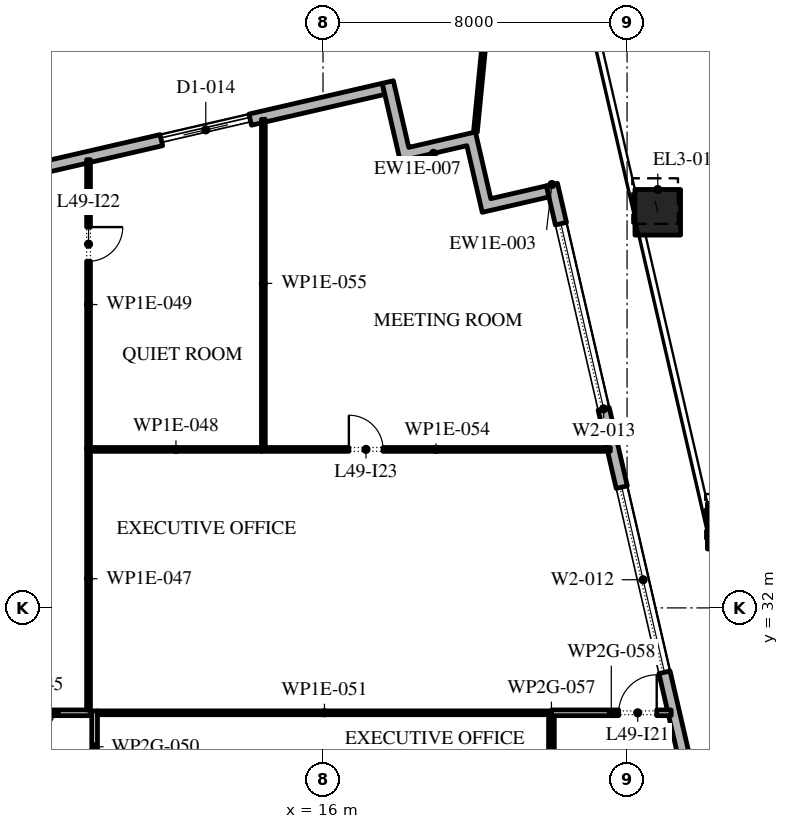
"""IFC4 building model, lengths in metres.
Left out: names, types, materials, properties, quantities, classifications, styles, units other than length and angle.
Written with IfcOpenShell. Run it as: python <this file> out.ifc"""

import sys

from ifc_helpers import new_model, si_unit, direction, frame, frame_2d, origin, origin_2d, place, context, subcontext, project, spatial, polyline, rectangle, outline, extrude, element, fill, save


model = new_model("IFC4")
c1 = context("Model", 3, precision=1e-05, world=origin(), true_north=direction((0.0, 1.0)))
c2 = subcontext(c1, "Body", "Model", "MODEL_VIEW")
j1 = project(units=[si_unit("LENGTHUNIT", "METRE"), si_unit("PLANEANGLEUNIT", "RADIAN")], contexts=[c1])
p1 = place(None, origin())
s1 = spatial("IfcSite", under=j1, at=p1, CompositionType="ELEMENT")
p2 = place(p1, origin())
s2 = spatial("IfcBuilding", under=s1, at=p2, CompositionType="ELEMENT")
p3 = place(p2, frame((0.0, 0.0, 222.0)))
s3 = spatial("IfcBuildingStorey", under=s2, at=p3, CompositionType="ELEMENT", Elevation=222.0)
p4 = place(p3, frame((26.715, 34.15, 0.0), z_axis=(-0.013461799865, 0.058373149415, 0.998204064995), x_axis=(-0.974423835271, -0.224718021653, 0.0)))
e1 = element("IfcColumn", 1, at=p4, inside=s3, PredefinedType="COLUMN", context=c2, shape_type="SweptSolid", body=[
    extrude(rectangle(XDim=1.2, YDim=1.2, at=origin_2d()), origin(), (0.0, 0.0, 1.0), 4.208),
])
p5 = place(p3, frame((24.808, 42.409, 0.0), z_axis=(-0.016176147103, 0.070038658424, 0.997413113304), x_axis=(-0.97435039746, -0.225036225904, 0.0)))
e2 = element("IfcColumn", 2, at=p5, inside=s3, PredefinedType="COLUMN", context=c2, shape_type="SweptSolid", body=[
    extrude(rectangle(XDim=1.2, YDim=1.2, at=origin_2d()), origin(), (0.0, 0.0, 1.0), 4.211),
])
p6 = place(p3, frame((33.157, -5.092, 0.0), z_axis=(0.0, 0.0, 1.0), x_axis=(-0.224950279389, 0.974370243697, 0.0)))
e3 = element("IfcWall", 3, at=p6, inside=s3, PredefinedType="STANDARD", context=c2, shape_type="SweptSolid", body=[
    extrude(rectangle(XDim=49.5, YDim=0.3, at=frame_2d((24.75, 0.0))), origin(), (0.0, 0.0, 1.0), 3.75),
])
p7 = place(p6, frame((2.207, 0.0, 0.0)))
e4 = element("IfcOpeningElement", 4, at=p7, cuts=e3, PredefinedType="OPENING", context=c2, shape_type="SweptSolid", body=[
    extrude(rectangle(XDim=2.4, YDim=2.875, at=frame_2d((1.2, 1.438))), frame((0.0, 0.16, 0.0), z_axis=(0.0, -1.0, 0.0), x_axis=(1.0, 0.0, 0.0)), (0.0, 0.0, 1.0), 0.32),
])
p8 = place(p6, frame((7.871, 0.0, 0.45)))
e5 = element("IfcOpeningElement", 5, at=p8, cuts=e3, PredefinedType="OPENING", context=c2, shape_type="SweptSolid", body=[
    extrude(rectangle(XDim=5.0, YDim=2.575, at=frame_2d((2.5, 1.288))), frame((0.0, 0.16, 0.0), z_axis=(0.0, -1.0, 0.0), x_axis=(1.0, 0.0, 0.0)), (0.0, 0.0, 1.0), 0.32),
])
p9 = place(p6, frame((14.986, 0.0, 0.45)))
e6 = element("IfcOpeningElement", 6, at=p9, cuts=e3, PredefinedType="OPENING", context=c2, shape_type="SweptSolid", body=[
    extrude(rectangle(XDim=5.0, YDim=2.625, at=frame_2d((2.5, 1.312))), frame((0.0, 0.16, 0.0), z_axis=(0.0, -1.0, 0.0), x_axis=(1.0, 0.0, 0.0)), (0.0, 0.0, 1.0), 0.32),
])
p10 = place(p6, frame((22.1, 0.0, 0.45)))
e7 = element("IfcOpeningElement", 7, at=p10, cuts=e3, PredefinedType="OPENING", context=c2, shape_type="SweptSolid", body=[
    extrude(rectangle(XDim=5.0, YDim=2.75, at=frame_2d((2.5, 1.375))), frame((0.0, 0.16, 0.0), z_axis=(0.0, -1.0, 0.0), x_axis=(1.0, 0.0, 0.0)), (0.0, 0.0, 1.0), 0.32),
])
p11 = place(p6, frame((30.514, 0.0, 0.0)))
e8 = element("IfcOpeningElement", 8, at=p11, cuts=e3, PredefinedType="OPENING", context=c2, shape_type="SweptSolid", body=[
    extrude(rectangle(XDim=2.4, YDim=3.2, at=frame_2d((1.2, 1.6))), frame((0.0, 0.16, 0.0), z_axis=(0.0, -1.0, 0.0), x_axis=(1.0, 0.0, 0.0)), (0.0, 0.0, 1.0), 0.32),
])
p12 = place(p6, frame((36.329, 0.0, 0.45)))
e9 = element("IfcOpeningElement", 9, at=p12, cuts=e3, PredefinedType="OPENING", context=c2, shape_type="SweptSolid", body=[
    extrude(rectangle(XDim=5.0, YDim=3.25, at=frame_2d((2.5, 1.625))), frame((0.0, 0.16, 0.0), z_axis=(0.0, -1.0, 0.0), x_axis=(1.0, 0.0, 0.0)), (0.0, 0.0, 1.0), 0.32),
])
p13 = place(p6, frame((43.443, 0.0, 0.45)))
e10 = element("IfcOpeningElement", 10, at=p13, cuts=e3, PredefinedType="OPENING", context=c2, shape_type="SweptSolid", body=[
    extrude(rectangle(XDim=5.0, YDim=3.25, at=frame_2d((2.5, 1.625))), frame((0.0, 0.16, 0.0), z_axis=(0.0, -1.0, 0.0), x_axis=(1.0, 0.0, 0.0)), (0.0, 0.0, 1.0), 0.32),
])
p14 = place(p3, frame((17.592, 45.657, 0.0), z_axis=(0.0, 0.0, 1.0), x_axis=(-0.974370243697, -0.224950279389, 0.0)))
e11 = element("IfcWall", 11, at=p14, inside=s3, PredefinedType="STANDARD", context=c2, shape_type="SweptSolid", body=[
    extrude(rectangle(XDim=49.5, YDim=0.3, at=frame_2d((24.75, 0.0))), origin(), (0.0, 0.0, 1.0), 3.75),
])
p15 = place(p14, frame((3.6, 0.0, 0.0)))
e12 = element("IfcOpeningElement", 12, at=p15, cuts=e11, PredefinedType="OPENING", context=c2, shape_type="SweptSolid", body=[
    extrude(rectangle(XDim=2.4, YDim=3.5, at=frame_2d((1.2, 1.75))), frame((0.0, 0.16, 0.0), z_axis=(0.0, -1.0, 0.0), x_axis=(1.0, 0.0, 0.0)), (0.0, 0.0, 1.0), 0.32),
])
p16 = place(p14, frame((9.65, 0.0, 0.45)))
e13 = element("IfcOpeningElement", 13, at=p16, cuts=e11, PredefinedType="OPENING", context=c2, shape_type="SweptSolid", body=[
    extrude(rectangle(XDim=5.0, YDim=2.2, at=frame_2d((2.5, 1.1))), frame((0.0, 0.16, 0.0), z_axis=(0.0, -1.0, 0.0), x_axis=(1.0, 0.0, 0.0)), (0.0, 0.0, 1.0), 0.32),
])
p17 = place(p14, frame((17.95, 0.0, 0.45)))
e14 = element("IfcOpeningElement", 14, at=p17, cuts=e11, PredefinedType="OPENING", context=c2, shape_type="SweptSolid", body=[
    extrude(rectangle(XDim=5.0, YDim=2.2, at=frame_2d((2.5, 1.1))), frame((0.0, 0.16, 0.0), z_axis=(0.0, -1.0, 0.0), x_axis=(1.0, 0.0, 0.0)), (0.0, 0.0, 1.0), 0.32),
])
p18 = place(p14, frame((26.25, 0.0, 0.45)))
e15 = element("IfcOpeningElement", 15, at=p18, cuts=e11, PredefinedType="OPENING", context=c2, shape_type="SweptSolid", body=[
    extrude(rectangle(XDim=5.0, YDim=2.2, at=frame_2d((2.5, 1.1))), frame((0.0, 0.16, 0.0), z_axis=(0.0, -1.0, 0.0), x_axis=(1.0, 0.0, 0.0)), (0.0, 0.0, 1.0), 0.32),
])
p19 = place(p14, frame((35.85, 0.0, 0.0)))
e16 = element("IfcOpeningElement", 16, at=p19, cuts=e11, PredefinedType="OPENING", context=c2, shape_type="SweptSolid", body=[
    extrude(rectangle(XDim=2.4, YDim=2.7, at=frame_2d((1.2, 1.35))), frame((0.0, 0.16, 0.0), z_axis=(0.0, -1.0, 0.0), x_axis=(1.0, 0.0, 0.0)), (0.0, 0.0, 1.0), 0.32),
])
p20 = place(p14, frame((42.85, 0.0, 0.45)))
e17 = element("IfcOpeningElement", 17, at=p20, cuts=e11, PredefinedType="OPENING", context=c2, shape_type="SweptSolid", body=[
    extrude(rectangle(XDim=5.0, YDim=2.275, at=frame_2d((2.5, 1.137))), frame((0.0, 0.16, 0.0), z_axis=(0.0, -1.0, 0.0), x_axis=(1.0, 0.0, 0.0)), (0.0, 0.0, 1.0), 0.32),
])
p21 = place(p3, origin())
e18 = element("IfcWall", 18, at=p21, inside=s3, PredefinedType="STANDARD", context=c2, shape_type="SweptSolid", body=[
    extrude(outline(polyline([(19.785, 44.162), (18.031, 43.757), (17.558, 45.803), (17.851, 45.871), (18.256, 44.117), (20.01, 44.522), (20.414, 42.768), (21.876, 43.105), (21.943, 42.813), (20.19, 42.408), (19.785, 44.162)])), origin(), (0.0, 0.0, 1.0), 3.75),
])
p22 = place(p3, frame((20.01, 44.522, -0.05), z_axis=(0.0, 0.0, 1.0), x_axis=(0.097239826171, 0.995260978943, 0.0)))
e19 = element("IfcWall", 19, at=p22, inside=s3, PredefinedType="STANDARD", context=c2, shape_type="SweptSolid", body=[
    extrude(rectangle(XDim=6.663, YDim=0.1, at=frame_2d((3.332, 0.0))), origin(), (0.0, 0.0, 1.0), 3.8),
])
p23 = place(p3, frame((8.085, 29.24, 0.0), z_axis=(0.0, 0.0, 1.0), x_axis=(1.0, 0.0, 0.0)))
e20 = element("IfcWall", 20, at=p23, inside=s3, PredefinedType="PARTITIONING", context=c2, shape_type="SweptSolid", body=[
    extrude(rectangle(XDim=1.795, YDim=0.15, at=frame_2d((0.897, 0.0))), origin(), (0.0, 0.0, 1.0), 3.75),
])
p24 = place(p3, frame((9.83, 36.22, 0.0), z_axis=(0.0, 0.0, 1.0), x_axis=(0.0, -1.0, 0.0)))
e21 = element("IfcWall", 21, at=p24, inside=s3, PredefinedType="PARTITIONING", context=c2, shape_type="SweptSolid", body=[
    extrude(rectangle(XDim=6.905, YDim=0.1, at=frame_2d((3.453, 0.0))), origin(), (0.0, 0.0, 1.0), 3.75),
])
p25 = place(p3, frame((9.88, 36.17, 0.0), z_axis=(0.0, 0.0, 1.0), x_axis=(1.0, 0.0, 0.0)))
e22 = element("IfcWall", 22, at=p25, inside=s3, PredefinedType="PARTITIONING", context=c2, shape_type="SweptSolid", body=[
    extrude(rectangle(XDim=4.5, YDim=0.1, at=frame_2d((2.25, 0.0))), origin(), (0.0, 0.0, 1.0), 3.75),
])
p26 = place(p3, frame((9.83, 43.794, 0.0), z_axis=(0.0, 0.0, 1.0), x_axis=(0.0, -1.0, 0.0)))
e23 = element("IfcWall", 23, at=p26, inside=s3, PredefinedType="PARTITIONING", context=c2, shape_type="SweptSolid", body=[
    extrude(rectangle(XDim=7.624, YDim=0.1, at=frame_2d((3.812, 0.0))), origin(), (0.0, 0.0, 1.0), 3.75),
])
p27 = place(p26, frame((1.774, 0.0, 0.0)))
e24 = element("IfcOpeningElement", 24, at=p27, cuts=e23, PredefinedType="OPENING", context=c2, shape_type="SweptSolid", body=[
    extrude(rectangle(XDim=0.9, YDim=2.1, at=frame_2d((0.45, 1.05))), frame((0.0, 0.06, 0.0), z_axis=(0.0, -1.0, 0.0), x_axis=(1.0, 0.0, 0.0)), (0.0, 0.0, 1.0), 0.12),
])
p28 = place(p3, frame((9.99, 29.29, 0.0), z_axis=(0.0, 0.0, 1.0), x_axis=(0.0, -1.0, 0.0)))
e25 = element("IfcWall", 25, at=p28, inside=s3, PredefinedType="PARTITIONING", context=c2, shape_type="SweptSolid", body=[
    extrude(rectangle(XDim=1.89, YDim=0.15, at=frame_2d((0.945, 0.0))), origin(), (0.0, 0.0, 1.0), 3.75),
])
p29 = place(p3, frame((10.065, 29.24, 0.0), z_axis=(0.0, 0.0, 1.0), x_axis=(1.0, 0.0, 0.0)))
e26 = element("IfcWall", 26, at=p29, inside=s3, PredefinedType="PARTITIONING", context=c2, shape_type="SweptSolid", body=[
    extrude(rectangle(XDim=11.945, YDim=0.1, at=frame_2d((5.973, 0.0))), origin(), (0.0, 0.0, 1.0), 3.75),
])
p30 = place(p3, frame((14.38, 36.17, 0.0), z_axis=(0.0, 0.0, 1.0), x_axis=(1.0, 0.0, 0.0)))
e27 = element("IfcWall", 27, at=p30, inside=s3, PredefinedType="PARTITIONING", context=c2, shape_type="SweptSolid", body=[
    extrude(rectangle(XDim=9.18, YDim=0.1, at=frame_2d((4.59, 0.0))), origin(), (0.0, 0.0, 1.0), 3.75),
])
p31 = place(p30, frame((2.3, 0.0, 0.0)))
e28 = element("IfcOpeningElement", 28, at=p31, cuts=e27, PredefinedType="OPENING", context=c2, shape_type="SweptSolid", body=[
    extrude(rectangle(XDim=0.9, YDim=2.1, at=frame_2d((0.45, 1.05))), frame((0.0, 0.06, 0.0), z_axis=(0.0, -1.0, 0.0), x_axis=(1.0, 0.0, 0.0)), (0.0, 0.0, 1.0), 0.12),
])
p32 = place(p3, frame((14.43, 44.856, 0.0), z_axis=(0.0, 0.0, 1.0), x_axis=(0.0, -1.0, 0.0)))
e29 = element("IfcWall", 29, at=p32, inside=s3, PredefinedType="PARTITIONING", context=c2, shape_type="SweptSolid", body=[
    extrude(rectangle(XDim=8.636, YDim=0.1, at=frame_2d((4.318, 0.0))), origin(), (0.0, 0.0, 1.0), 3.75),
])
p33 = place(p3, frame((22.01, 27.4, 0.0), z_axis=(0.0, 0.0, 1.0), x_axis=(0.0, 1.0, 0.0)))
e30 = element("IfcWall", 30, at=p33, inside=s3, PredefinedType="PARTITIONING", context=c2, shape_type="SweptSolid", body=[
    extrude(rectangle(XDim=1.79, YDim=0.15, at=frame_2d((0.895, 0.0))), origin(), (0.0, 0.0, 1.0), 3.75),
])
p34 = place(p3, frame((22.01, 29.24, 0.0), z_axis=(0.0, 0.0, 1.0), x_axis=(1.0, 0.0, 0.0)))
e31 = element("IfcWall", 31, at=p34, inside=s3, PredefinedType="PARTITIONING", context=c2, shape_type="SweptSolid", body=[
    extrude(rectangle(XDim=3.15, YDim=0.15, at=frame_2d((1.575, 0.0))), origin(), (0.0, 0.0, 1.0), 3.75),
])
p35 = place(p34, frame((1.77, 0.0, 0.0)))
e32 = element("IfcOpeningElement", 32, at=p35, cuts=e31, PredefinedType="OPENING", context=c2, shape_type="SweptSolid", body=[
    extrude(rectangle(XDim=1.0, YDim=2.1, at=frame_2d((0.5, 1.05))), frame((0.0, 0.085, 0.0), z_axis=(0.0, -1.0, 0.0), x_axis=(1.0, 0.0, 0.0)), (0.0, 0.0, 1.0), 0.17),
])
p36 = place(p12, origin())
e33 = element("IfcWindow", 33, at=p36, inside=s3, PartitioningType="DOUBLE_PANEL_VERTICAL", PredefinedType="WINDOW", context=c2, shape_type="SweptSolid", body=[
    extrude(rectangle(XDim=5.0, YDim=3.25, at=frame_2d((2.5, 1.625))), frame((0.0, 0.03, 0.0), z_axis=(0.0, -1.0, 0.0), x_axis=(1.0, 0.0, 0.0)), (0.0, 0.0, 1.0), 0.06),
])
fill(e9, e33)
p37 = place(p13, origin())
e34 = element("IfcWindow", 34, at=p37, inside=s3, PartitioningType="DOUBLE_PANEL_VERTICAL", PredefinedType="WINDOW", context=c2, shape_type="SweptSolid", body=[
    extrude(rectangle(XDim=5.0, YDim=3.25, at=frame_2d((2.5, 1.625))), frame((0.0, 0.03, 0.0), z_axis=(0.0, -1.0, 0.0), x_axis=(1.0, 0.0, 0.0)), (0.0, 0.0, 1.0), 0.06),
])
fill(e10, e34)
p38 = place(p15, origin())
e35 = element("IfcDoor", 35, at=p38, inside=s3, OperationType="DOUBLE_DOOR_SLIDING", PredefinedType="DOOR", context=c2, shape_type="SweptSolid", body=[
    extrude(rectangle(XDim=2.4, YDim=3.5, at=frame_2d((1.2, 1.75))), frame((0.0, 0.025, 0.0), z_axis=(0.0, -1.0, 0.0), x_axis=(1.0, 0.0, 0.0)), (0.0, 0.0, 1.0), 0.05),
])
fill(e12, e35)
p39 = place(p35, origin())
e36 = element("IfcDoor", 36, at=p39, inside=s3, OperationType="SINGLE_SWING_LEFT", PredefinedType="DOOR", context=c2, shape_type="SweptSolid", body=[
    extrude(rectangle(XDim=1.0, YDim=2.1, at=frame_2d((0.5, 1.05))), frame((0.0, 0.025, 0.0), z_axis=(0.0, -1.0, 0.0), x_axis=(1.0, 0.0, 0.0)), (0.0, 0.0, 1.0), 0.05),
])
fill(e32, e36)
p40 = place(p27, origin())
e37 = element("IfcDoor", 37, at=p40, inside=s3, OperationType="SINGLE_SWING_RIGHT", PredefinedType="DOOR", context=c2, shape_type="SweptSolid", body=[
    extrude(rectangle(XDim=0.9, YDim=2.1, at=frame_2d((0.45, 1.05))), frame((0.0, 0.025, 0.0), z_axis=(0.0, -1.0, 0.0), x_axis=(1.0, 0.0, 0.0)), (0.0, 0.0, 1.0), 0.05),
])
fill(e24, e37)
p41 = place(p31, origin())
e38 = element("IfcDoor", 38, at=p41, inside=s3, OperationType="SINGLE_SWING_RIGHT", PredefinedType="DOOR", context=c2, shape_type="SweptSolid", body=[
    extrude(rectangle(XDim=0.9, YDim=2.1, at=frame_2d((0.45, 1.05))), frame((0.0, 0.025, 0.0), z_axis=(0.0, -1.0, 0.0), x_axis=(1.0, 0.0, 0.0)), (0.0, 0.0, 1.0), 0.05),
])
fill(e28, e38)
save(model, sys.argv[1])
